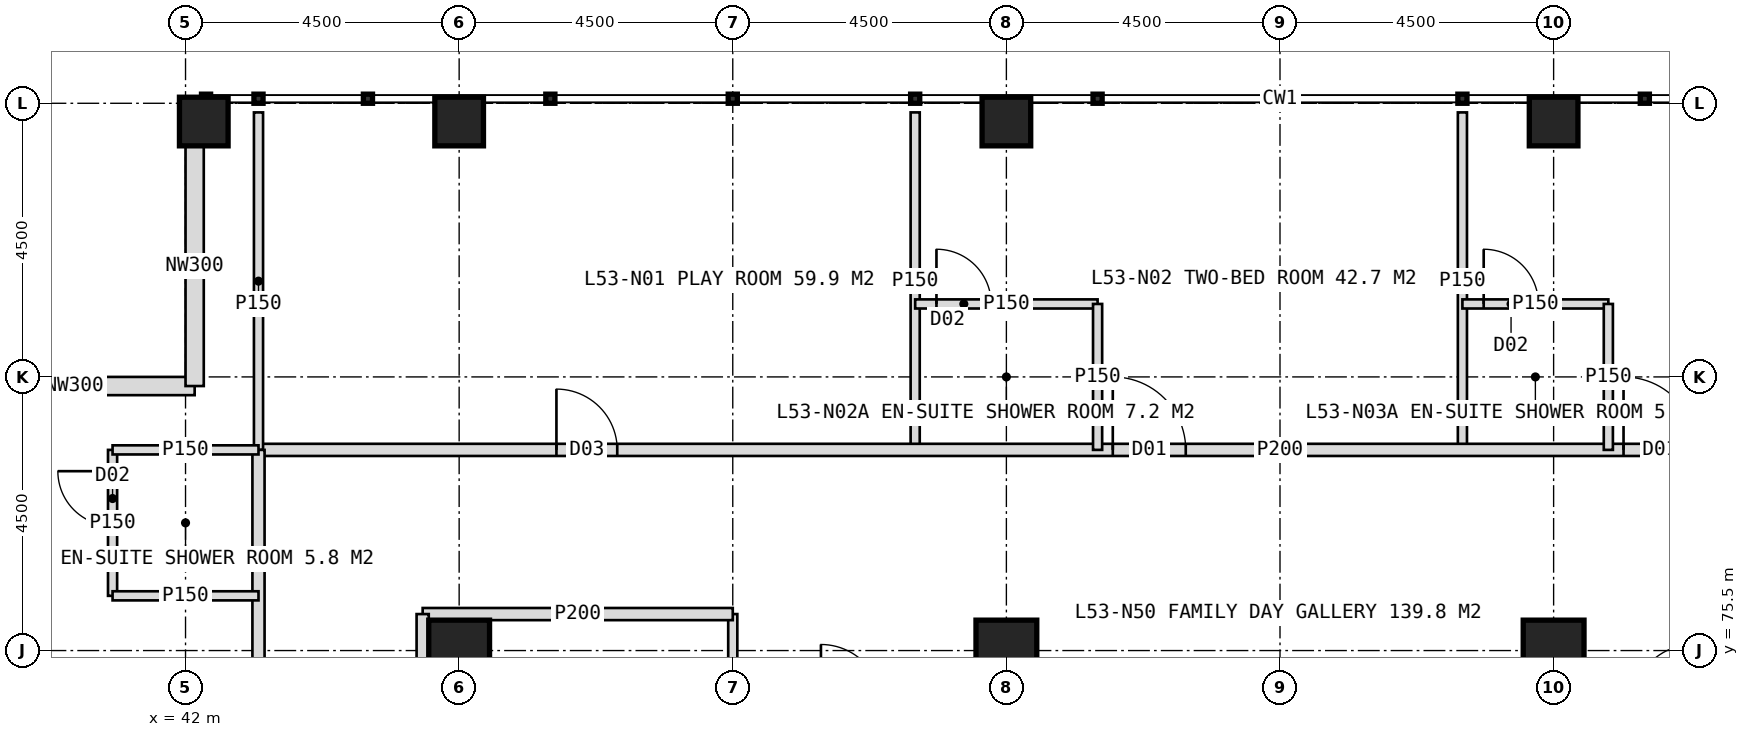
"""IFC4 building model, lengths in metres.
Left out: names, types, materials, properties, quantities, classifications, styles, units other than length and angle.
Written with IfcOpenShell. Run it as: python <this file> out.ifc"""

import sys

from ifc_helpers import new_model, si_unit, direction, frame, frame_2d, origin, origin_2d, place, context, subcontext, project, spatial, rectangle, hollow_rectangle, extrude, element, fill, save


model = new_model("IFC4")
c1 = context("Model", 3, precision=1e-05, world=origin(), true_north=direction((0.0, 1.0)))
c2 = subcontext(c1, "Body", "Model", "MODEL_VIEW")
j1 = project(units=[si_unit("LENGTHUNIT", "METRE"), si_unit("PLANEANGLEUNIT", "RADIAN")], contexts=[c1])
p1 = place(None, origin())
s1 = spatial("IfcSite", under=j1, at=p1, CompositionType="ELEMENT")
p2 = place(p1, origin())
s2 = spatial("IfcBuilding", under=s1, at=p2, CompositionType="ELEMENT")
p3 = place(p2, frame((0.0, 0.0, 221.0)))
s3 = spatial("IfcBuildingStorey", under=s2, at=p3, CompositionType="ELEMENT", Elevation=221.0)
for number, where, z_axis, x_axis in (
    (1, (46.5, 75.5, 0.0), (0.0, 0.0, 1.0), (1.0, 0.0, 0.0)),
    (2, (55.5, 75.5, 0.0), (0.0, 0.0, 1.0), (1.0, 0.0, 0.0)),
    (3, (64.5, 75.5, 0.0), (0.0, 0.0, 1.0), (1.0, 0.0, 0.0)),
):
    element("IfcColumn", number, at=place(p3, frame(where, z_axis=z_axis, x_axis=x_axis)), inside=s3, PredefinedType="COLUMN", context=c2, shape_type="SweptSolid", body=[
        extrude(hollow_rectangle(XDim=1.0, YDim=1.0, WallThickness=0.1, at=origin_2d()), origin(), (0.0, 0.0, 1.0), 4.0),
    ])
for number, where, z_axis, x_axis in (
    (4, (42.3, 84.2, 0.0), (0.0, 0.0, 1.0), (1.0, 0.0, 0.0)),
    (5, (46.5, 84.2, 0.0), (0.0, 0.0, 1.0), (1.0, 0.0, 0.0)),
    (6, (55.5, 84.2, 0.0), (0.0, 0.0, 1.0), (1.0, 0.0, 0.0)),
    (7, (64.5, 84.2, 0.0), (0.0, 0.0, 1.0), (1.0, 0.0, 0.0)),
):
    element("IfcColumn", number, at=place(p3, frame(where, z_axis=z_axis, x_axis=x_axis)), inside=s3, PredefinedType="COLUMN", context=c2, shape_type="SweptSolid", body=[
        extrude(hollow_rectangle(XDim=0.8, YDim=0.8, WallThickness=0.08, at=origin_2d()), origin(), (0.0, 0.0, 1.0), 4.0),
    ])
for number, where, z_axis, x_axis in (
    (8, (38.2, 79.85, 0.0), (0.0, 0.0, 1.0), (1.0, 0.0, 0.0)),
    (9, (42.15, 79.85, 0.0), (0.0, 0.0, 1.0), (0.0, 1.0, 0.0)),
):
    element("IfcWall", number, at=place(p3, frame(where, z_axis=z_axis, x_axis=x_axis)), inside=s3, PredefinedType="ELEMENTEDWALL", context=c2, shape_type="SweptSolid", body=[
        extrude(rectangle(XDim=3.95, YDim=0.3, at=frame_2d((1.975, 0.0))), origin(), (0.0, 0.0, 1.0), 2.85),
    ])
for number, where, z_axis, x_axis in (
    (10, (54.0, 78.8, 0.0), (0.0, 0.0, 1.0), (0.0, 1.0, 0.0)),
    (11, (63.0, 78.8, 0.0), (0.0, 0.0, 1.0), (0.0, 1.0, 0.0)),
):
    element("IfcWall", number, at=place(p3, frame(where, z_axis=z_axis, x_axis=x_axis)), inside=s3, PredefinedType="PARTITIONING", context=c2, shape_type="SweptSolid", body=[
        extrude(rectangle(XDim=5.55, YDim=0.15, at=frame_2d((2.775, 0.0))), origin(), (0.0, 0.0, 1.0), 3.75),
    ])
p4 = place(p3, frame((43.2, 78.8, 0.0), z_axis=(0.0, 0.0, 1.0), x_axis=(1.0, 0.0, 0.0)))
e12 = element("IfcWall", 12, at=p4, inside=s3, PredefinedType="PARTITIONING", context=c2, shape_type="SweptSolid", body=[
    extrude(rectangle(XDim=33.6, YDim=0.2, at=frame_2d((16.8, 0.0))), origin(), (0.0, 0.0, 1.0), 3.75),
])
p5 = place(p4, frame((4.9, 0.0, 0.0)))
e13 = element("IfcOpeningElement", 13, at=p5, cuts=e12, PredefinedType="OPENING", context=c2, shape_type="SweptSolid", body=[
    extrude(rectangle(XDim=1.0, YDim=2.1, at=frame_2d((0.5, 1.05))), frame((0.0, 0.11, 0.0), z_axis=(0.0, -1.0, 0.0), x_axis=(1.0, 0.0, 0.0)), (0.0, 0.0, 1.0), 0.22),
])
p6 = place(p4, frame((14.05, 0.0, 0.0)))
e14 = element("IfcOpeningElement", 14, at=p6, cuts=e12, PredefinedType="OPENING", context=c2, shape_type="SweptSolid", body=[
    extrude(rectangle(XDim=1.2, YDim=2.2, at=frame_2d((0.6, 1.1))), frame((0.0, 0.11, 0.0), z_axis=(0.0, -1.0, 0.0), x_axis=(1.0, 0.0, 0.0)), (0.0, 0.0, 1.0), 0.22),
])
p7 = place(p4, frame((22.45, 0.0, 0.0)))
e15 = element("IfcOpeningElement", 15, at=p7, cuts=e12, PredefinedType="OPENING", context=c2, shape_type="SweptSolid", body=[
    extrude(rectangle(XDim=1.2, YDim=2.2, at=frame_2d((0.6, 1.1))), frame((0.0, 0.11, 0.0), z_axis=(0.0, -1.0, 0.0), x_axis=(1.0, 0.0, 0.0)), (0.0, 0.0, 1.0), 0.22),
])
p8 = place(p3, frame((43.2, 78.8, 0.0), z_axis=(0.0, 0.0, 1.0), x_axis=(0.0, 1.0, 0.0)))
e16 = element("IfcWall", 16, at=p8, inside=s3, PredefinedType="PARTITIONING", context=c2, shape_type="SweptSolid", body=[
    extrude(rectangle(XDim=5.55, YDim=0.15, at=frame_2d((2.775, 0.0))), origin(), (0.0, 0.0, 1.0), 3.75),
])
p9 = place(p3, frame((54.0, 81.2, 0.0), z_axis=(0.0, 0.0, 1.0), x_axis=(1.0, 0.0, 0.0)))
e17 = element("IfcWall", 17, at=p9, inside=s3, PredefinedType="PARTITIONING", context=c2, shape_type="SweptSolid", body=[
    extrude(rectangle(XDim=3.0, YDim=0.15, at=frame_2d((1.5, 0.0))), origin(), (0.0, 0.0, 1.0), 3.75),
])
p10 = place(p9, frame((0.35, 0.0, 0.0)))
e18 = element("IfcOpeningElement", 18, at=p10, cuts=e17, PredefinedType="OPENING", context=c2, shape_type="SweptSolid", body=[
    extrude(rectangle(XDim=0.9, YDim=2.1, at=frame_2d((0.45, 1.05))), frame((0.0, 0.085, 0.0), z_axis=(0.0, -1.0, 0.0), x_axis=(1.0, 0.0, 0.0)), (0.0, 0.0, 1.0), 0.17),
])
p11 = place(p3, frame((57.0, 78.8, 0.0), z_axis=(0.0, 0.0, 1.0), x_axis=(0.0, 1.0, 0.0)))
e19 = element("IfcWall", 19, at=p11, inside=s3, PredefinedType="PARTITIONING", context=c2, shape_type="SweptSolid", body=[
    extrude(rectangle(XDim=2.4, YDim=0.15, at=frame_2d((1.2, 0.0))), origin(), (0.0, 0.0, 1.0), 3.75),
])
p12 = place(p3, frame((63.0, 81.2, 0.0), z_axis=(0.0, 0.0, 1.0), x_axis=(1.0, 0.0, 0.0)))
e20 = element("IfcWall", 20, at=p12, inside=s3, PredefinedType="PARTITIONING", context=c2, shape_type="SweptSolid", body=[
    extrude(rectangle(XDim=2.4, YDim=0.15, at=frame_2d((1.2, 0.0))), origin(), (0.0, 0.0, 1.0), 3.75),
])
p13 = place(p12, frame((0.35, 0.0, 0.0)))
e21 = element("IfcOpeningElement", 21, at=p13, cuts=e20, PredefinedType="OPENING", context=c2, shape_type="SweptSolid", body=[
    extrude(rectangle(XDim=0.9, YDim=2.1, at=frame_2d((0.45, 1.05))), frame((0.0, 0.085, 0.0), z_axis=(0.0, -1.0, 0.0), x_axis=(1.0, 0.0, 0.0)), (0.0, 0.0, 1.0), 0.17),
])
p14 = place(p3, frame((65.4, 78.8, 0.0), z_axis=(0.0, 0.0, 1.0), x_axis=(0.0, 1.0, 0.0)))
e22 = element("IfcWall", 22, at=p14, inside=s3, PredefinedType="PARTITIONING", context=c2, shape_type="SweptSolid", body=[
    extrude(rectangle(XDim=2.4, YDim=0.15, at=frame_2d((1.2, 0.0))), origin(), (0.0, 0.0, 1.0), 3.75),
])
p15 = place(p3, frame((51.0, 71.0, 0.0), z_axis=(0.0, 0.0, 1.0), x_axis=(0.0, 1.0, 0.0)))
e23 = element("IfcWall", 23, at=p15, inside=s3, PredefinedType="PARTITIONING", context=c2, shape_type="SweptSolid", body=[
    extrude(rectangle(XDim=5.1, YDim=0.15, at=frame_2d((2.55, 0.0))), origin(), (0.0, 0.0, 1.0), 3.75),
])
p16 = place(p3, frame((45.9, 76.1, 0.0), z_axis=(0.0, 0.0, 1.0), x_axis=(1.0, 0.0, 0.0)))
e24 = element("IfcWall", 24, at=p16, inside=s3, PredefinedType="PARTITIONING", context=c2, shape_type="SweptSolid", body=[
    extrude(rectangle(XDim=5.1, YDim=0.2, at=frame_2d((2.55, 0.0))), origin(), (0.0, 0.0, 1.0), 3.75),
])
p17 = place(p3, frame((43.2, 45.2, 0.0), z_axis=(0.0, 0.0, 1.0), x_axis=(0.0, 1.0, 0.0)))
e25 = element("IfcWall", 25, at=p17, inside=s3, PredefinedType="PARTITIONING", context=c2, shape_type="SweptSolid", body=[
    extrude(rectangle(XDim=33.6, YDim=0.2, at=frame_2d((16.8, 0.0))), origin(), (0.0, 0.0, 1.0), 3.75),
])
p18 = place(p17, frame((3.25, 0.0, 0.0)))
e26 = element("IfcOpeningElement", 26, at=p18, cuts=e25, PredefinedType="OPENING", context=c2, shape_type="SweptSolid", body=[
    extrude(rectangle(XDim=1.2, YDim=2.2, at=frame_2d((0.6, 1.1))), frame((0.0, 0.11, 0.0), z_axis=(0.0, -1.0, 0.0), x_axis=(1.0, 0.0, 0.0)), (0.0, 0.0, 1.0), 0.22),
])
p19 = place(p17, frame((11.05, 0.0, 0.0)))
e27 = element("IfcOpeningElement", 27, at=p19, cuts=e25, PredefinedType="OPENING", context=c2, shape_type="SweptSolid", body=[
    extrude(rectangle(XDim=1.2, YDim=2.2, at=frame_2d((0.6, 1.1))), frame((0.0, 0.11, 0.0), z_axis=(0.0, -1.0, 0.0), x_axis=(1.0, 0.0, 0.0)), (0.0, 0.0, 1.0), 0.22),
])
p20 = place(p17, frame((20.05, 0.0, 0.0)))
e28 = element("IfcOpeningElement", 28, at=p20, cuts=e25, PredefinedType="OPENING", context=c2, shape_type="SweptSolid", body=[
    extrude(rectangle(XDim=1.2, YDim=2.2, at=frame_2d((0.6, 1.1))), frame((0.0, 0.11, 0.0), z_axis=(0.0, -1.0, 0.0), x_axis=(1.0, 0.0, 0.0)), (0.0, 0.0, 1.0), 0.22),
])
p21 = place(p17, frame((26.95, 0.0, 0.0)))
e29 = element("IfcOpeningElement", 29, at=p21, cuts=e25, PredefinedType="OPENING", context=c2, shape_type="SweptSolid", body=[
    extrude(rectangle(XDim=1.2, YDim=2.2, at=frame_2d((0.6, 1.1))), frame((0.0, 0.11, 0.0), z_axis=(0.0, -1.0, 0.0), x_axis=(1.0, 0.0, 0.0)), (0.0, 0.0, 1.0), 0.22),
])
p22 = place(p3, frame((40.8, 76.4, 0.0), z_axis=(0.0, 0.0, 1.0), x_axis=(0.0, 1.0, 0.0)))
e30 = element("IfcWall", 30, at=p22, inside=s3, PredefinedType="PARTITIONING", context=c2, shape_type="SweptSolid", body=[
    extrude(rectangle(XDim=2.4, YDim=0.15, at=frame_2d((1.2, 0.0))), origin(), (0.0, 0.0, 1.0), 3.75),
])
p23 = place(p22, frame((1.15, 0.0, 0.0)))
e31 = element("IfcOpeningElement", 31, at=p23, cuts=e30, PredefinedType="OPENING", context=c2, shape_type="SweptSolid", body=[
    extrude(rectangle(XDim=0.9, YDim=2.1, at=frame_2d((0.45, 1.05))), frame((0.0, 0.085, 0.0), z_axis=(0.0, -1.0, 0.0), x_axis=(1.0, 0.0, 0.0)), (0.0, 0.0, 1.0), 0.17),
])
for number, where, z_axis, x_axis in (
    (32, (43.2, 76.4, 0.0), (0.0, 0.0, 1.0), (-1.0, 0.0, 0.0)),
    (33, (43.2, 78.8, 0.0), (0.0, 0.0, 1.0), (-1.0, 0.0, 0.0)),
):
    element("IfcWall", number, at=place(p3, frame(where, z_axis=z_axis, x_axis=x_axis)), inside=s3, PredefinedType="PARTITIONING", context=c2, shape_type="SweptSolid", body=[
        extrude(rectangle(XDim=2.4, YDim=0.15, at=frame_2d((1.2, 0.0))), origin(), (0.0, 0.0, 1.0), 3.75),
    ])
p24 = place(p3, frame((45.9, 62.0, 0.0), z_axis=(0.0, 0.0, 1.0), x_axis=(0.0, 1.0, 0.0)))
e34 = element("IfcWall", 34, at=p24, inside=s3, PredefinedType="PARTITIONING", context=c2, shape_type="SweptSolid", body=[
    extrude(rectangle(XDim=14.1, YDim=0.2, at=frame_2d((7.05, 0.0))), origin(), (0.0, 0.0, 1.0), 3.75),
])
p25 = place(p24, frame((1.45, 0.0, 0.0)))
e35 = element("IfcOpeningElement", 35, at=p25, cuts=e34, PredefinedType="OPENING", context=c2, shape_type="SweptSolid", body=[
    extrude(rectangle(XDim=1.0, YDim=2.1, at=frame_2d((0.5, 1.05))), frame((0.0, 0.11, 0.0), z_axis=(0.0, -1.0, 0.0), x_axis=(1.0, 0.0, 0.0)), (0.0, 0.0, 1.0), 0.22),
])
p26 = place(p24, frame((10.3, 0.0, 0.0)))
e36 = element("IfcOpeningElement", 36, at=p26, cuts=e34, PredefinedType="OPENING", context=c2, shape_type="SweptSolid", body=[
    extrude(rectangle(XDim=1.0, YDim=2.1, at=frame_2d((0.5, 1.05))), frame((0.0, 0.11, 0.0), z_axis=(0.0, -1.0, 0.0), x_axis=(1.0, 0.0, 0.0)), (0.0, 0.0, 1.0), 0.22),
])
p27 = place(p5, origin())
e37 = element("IfcDoor", 37, at=p27, inside=s3, OperationType="SINGLE_SWING_LEFT", PredefinedType="DOOR", context=c2, shape_type="SweptSolid", body=[
    extrude(rectangle(XDim=1.0, YDim=2.1, at=frame_2d((0.5, 1.05))), frame((0.0, 0.025, 0.0), z_axis=(0.0, -1.0, 0.0), x_axis=(1.0, 0.0, 0.0)), (0.0, 0.0, 1.0), 0.05),
])
fill(e13, e37)
p28 = place(p6, origin())
e38 = element("IfcDoor", 38, at=p28, inside=s3, OperationType="SINGLE_SWING_LEFT", PredefinedType="DOOR", context=c2, shape_type="SweptSolid", body=[
    extrude(rectangle(XDim=1.2, YDim=2.2, at=frame_2d((0.6, 1.1))), frame((0.0, 0.025, 0.0), z_axis=(0.0, -1.0, 0.0), x_axis=(1.0, 0.0, 0.0)), (0.0, 0.0, 1.0), 0.05),
])
fill(e14, e38)
p29 = place(p10, origin())
e39 = element("IfcDoor", 39, at=p29, inside=s3, OperationType="SINGLE_SWING_LEFT", PredefinedType="DOOR", context=c2, shape_type="SweptSolid", body=[
    extrude(rectangle(XDim=0.9, YDim=2.1, at=frame_2d((0.45, 1.05))), frame((0.0, 0.025, 0.0), z_axis=(0.0, -1.0, 0.0), x_axis=(1.0, 0.0, 0.0)), (0.0, 0.0, 1.0), 0.05),
])
fill(e18, e39)
p30 = place(p7, origin())
e40 = element("IfcDoor", 40, at=p30, inside=s3, OperationType="SINGLE_SWING_LEFT", PredefinedType="DOOR", context=c2, shape_type="SweptSolid", body=[
    extrude(rectangle(XDim=1.2, YDim=2.2, at=frame_2d((0.6, 1.1))), frame((0.0, 0.025, 0.0), z_axis=(0.0, -1.0, 0.0), x_axis=(1.0, 0.0, 0.0)), (0.0, 0.0, 1.0), 0.05),
])
fill(e15, e40)
p31 = place(p13, origin())
e41 = element("IfcDoor", 41, at=p31, inside=s3, OperationType="SINGLE_SWING_LEFT", PredefinedType="DOOR", context=c2, shape_type="SweptSolid", body=[
    extrude(rectangle(XDim=0.9, YDim=2.1, at=frame_2d((0.45, 1.05))), frame((0.0, 0.025, 0.0), z_axis=(0.0, -1.0, 0.0), x_axis=(1.0, 0.0, 0.0)), (0.0, 0.0, 1.0), 0.05),
])
fill(e21, e41)
p32 = place(p23, origin())
e42 = element("IfcDoor", 42, at=p32, inside=s3, OperationType="SINGLE_SWING_RIGHT", PredefinedType="DOOR", context=c2, shape_type="SweptSolid", body=[
    extrude(rectangle(XDim=0.9, YDim=2.1, at=frame_2d((0.45, 1.05))), frame((0.0, 0.025, 0.0), z_axis=(0.0, -1.0, 0.0), x_axis=(1.0, 0.0, 0.0)), (0.0, 0.0, 1.0), 0.05),
])
fill(e31, e42)
save(model, sys.argv[1])
